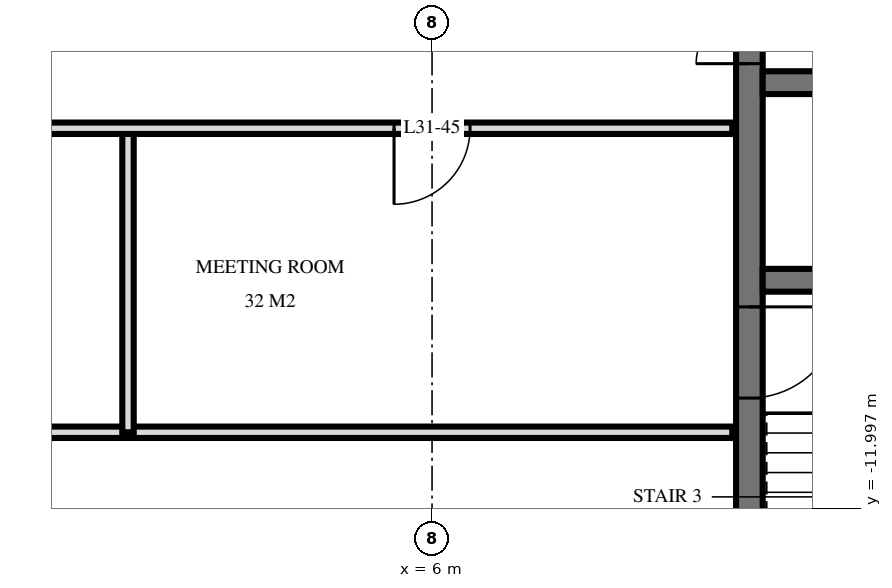
"""IFC4 building model, lengths in metres.
Left out: names, types, materials, properties, quantities, classifications, styles, units other than length and angle.
Written with IfcOpenShell. Run it as: python <this file> out.ifc"""

import sys

from ifc_helpers import new_model, si_unit, direction, frame, frame_2d, origin, place, context, subcontext, project, spatial, rectangle, extrude, element, fill, save


model = new_model("IFC4")
c1 = context("Model", 3, precision=1e-05, world=origin(), true_north=direction((0.0, 1.0)))
c2 = subcontext(c1, "Body", "Model", "MODEL_VIEW")
j1 = project(units=[si_unit("LENGTHUNIT", "METRE"), si_unit("PLANEANGLEUNIT", "RADIAN")], contexts=[c1])
p1 = place(None, origin())
s1 = spatial("IfcSite", under=j1, at=p1, CompositionType="ELEMENT")
p2 = place(p1, origin())
s2 = spatial("IfcBuilding", under=s1, at=p2, CompositionType="ELEMENT")
p3 = place(p2, frame((0.0, 0.0, 123.6)))
s3 = spatial("IfcBuildingStorey", under=s2, at=p3, CompositionType="ELEMENT", Elevation=123.6)
p4 = place(p3, frame((10.175, -14.55, 0.0), z_axis=(0.0, 0.0, 1.0), x_axis=(0.0, 1.0, 0.0)))
e1 = element("IfcWall", 1, at=p4, inside=s3, PredefinedType="SHEAR", context=c2, shape_type="SweptSolid", body=[
    extrude(rectangle(XDim=14.1, YDim=0.35, at=frame_2d((7.05, 0.0))), origin(), (0.0, 0.0, 1.0), 3.6),
])
p5 = place(p4, frame((8.4, 0.0, 0.0)))
e2 = element("IfcOpeningElement", 2, at=p5, cuts=e1, PredefinedType="OPENING", context=c2, shape_type="SweptSolid", body=[
    extrude(rectangle(XDim=1.4, YDim=2.4, at=frame_2d((0.7, 1.2))), frame((0.0, 0.185, 0.0), z_axis=(0.0, -1.0, 0.0), x_axis=(1.0, 0.0, 0.0)), (0.0, 0.0, 1.0), 0.37),
])
p6 = place(p4, frame((10.0, 0.0, 0.0)))
e3 = element("IfcOpeningElement", 3, at=p6, cuts=e1, PredefinedType="OPENING", context=c2, shape_type="SweptSolid", body=[
    extrude(rectangle(XDim=1.4, YDim=2.4, at=frame_2d((0.7, 1.2))), frame((0.0, 0.185, 0.0), z_axis=(0.0, -1.0, 0.0), x_axis=(1.0, 0.0, 0.0)), (0.0, 0.0, 1.0), 0.37),
])
p7 = place(p4, frame((4.0, 0.0, 0.0)))
e4 = element("IfcOpeningElement", 4, at=p7, cuts=e1, PredefinedType="OPENING", context=c2, shape_type="SweptSolid", body=[
    extrude(rectangle(XDim=1.2, YDim=2.1, at=frame_2d((0.6, 1.05))), frame((0.0, 0.185, 0.0), z_axis=(0.0, -1.0, 0.0), x_axis=(1.0, 0.0, 0.0)), (0.0, 0.0, 1.0), 0.37),
])
p8 = place(p3, frame((10.35, -6.4, 0.0), z_axis=(0.0, 0.0, 1.0), x_axis=(1.0, 0.0, 0.0)))
e5 = element("IfcWall", 5, at=p8, inside=s3, PredefinedType="SHEAR", context=c2, shape_type="SweptSolid", body=[
    extrude(rectangle(XDim=13.7, YDim=0.3, at=frame_2d((6.85, 0.0))), origin(), (0.0, 0.0, 1.0), 3.6),
])
p9 = place(p8, frame((12.05, 0.0, 0.0)))
e6 = element("IfcOpeningElement", 6, at=p9, cuts=e5, PredefinedType="OPENING", context=c2, shape_type="SweptSolid", body=[
    extrude(rectangle(XDim=1.1, YDim=2.1, at=frame_2d((0.55, 1.05))), frame((0.0, 0.16, 0.0), z_axis=(0.0, -1.0, 0.0), x_axis=(1.0, 0.0, 0.0)), (0.0, 0.0, 1.0), 0.32),
])
p10 = place(p8, frame((6.8, 0.0, 0.0)))
e7 = element("IfcOpeningElement", 7, at=p10, cuts=e5, PredefinedType="OPENING", context=c2, shape_type="SweptSolid", body=[
    extrude(rectangle(XDim=1.1, YDim=2.1, at=frame_2d((0.55, 1.05))), frame((0.0, 0.16, 0.0), z_axis=(0.0, -1.0, 0.0), x_axis=(1.0, 0.0, 0.0)), (0.0, 0.0, 1.0), 0.32),
])
p11 = place(p3, frame((10.35, -9.0, 0.0), z_axis=(0.0, 0.0, 1.0), x_axis=(1.0, 0.0, 0.0)))
e8 = element("IfcWall", 8, at=p11, inside=s3, PredefinedType="SHEAR", context=c2, shape_type="SweptSolid", body=[
    extrude(rectangle(XDim=13.7, YDim=0.3, at=frame_2d((6.85, 0.0))), origin(), (0.0, 0.0, 1.0), 3.6),
])
p12 = place(p11, frame((3.8, 0.0, 0.0)))
e9 = element("IfcOpeningElement", 9, at=p12, cuts=e8, PredefinedType="OPENING", context=c2, shape_type="SweptSolid", body=[
    extrude(rectangle(XDim=1.1, YDim=2.1, at=frame_2d((0.55, 1.05))), frame((0.0, 0.16, 0.0), z_axis=(0.0, -1.0, 0.0), x_axis=(1.0, 0.0, 0.0)), (0.0, 0.0, 1.0), 0.32),
])
p13 = place(p3, frame((2.0, -11.0, 0.0), z_axis=(0.0, 0.0, 1.0), x_axis=(0.0, 1.0, 0.0)))
e10 = element("IfcWall", 10, at=p13, inside=s3, PredefinedType="PARTITIONING", context=c2, shape_type="SweptSolid", body=[
    extrude(rectangle(XDim=4.0, YDim=0.15, at=frame_2d((2.0, 0.0))), origin(), (0.0, 0.0, 1.0), 3.32),
])
p14 = place(p3, frame((-9.95, -11.0, 0.0), z_axis=(0.0, 0.0, 1.0), x_axis=(1.0, 0.0, 0.0)))
e11 = element("IfcWall", 11, at=p14, inside=s3, PredefinedType="PARTITIONING", context=c2, shape_type="SweptSolid", body=[
    extrude(rectangle(XDim=19.9, YDim=0.15, at=frame_2d((9.95, 0.0))), origin(), (0.0, 0.0, 1.0), 3.32),
])
p15 = place(p14, frame((9.45, 0.0, 0.0)))
e12 = element("IfcOpeningElement", 12, at=p15, cuts=e11, PredefinedType="OPENING", context=c2, shape_type="SweptSolid", body=[
    extrude(rectangle(XDim=1.0, YDim=2.1, at=frame_2d((0.5, 1.05))), frame((0.0, 0.085, 0.0), z_axis=(0.0, -1.0, 0.0), x_axis=(1.0, 0.0, 0.0)), (0.0, 0.0, 1.0), 0.17),
])
p16 = place(p14, frame((3.45, 0.0, 0.0)))
e13 = element("IfcOpeningElement", 13, at=p16, cuts=e11, PredefinedType="OPENING", context=c2, shape_type="SweptSolid", body=[
    extrude(rectangle(XDim=1.0, YDim=2.1, at=frame_2d((0.5, 1.05))), frame((0.0, 0.085, 0.0), z_axis=(0.0, -1.0, 0.0), x_axis=(1.0, 0.0, 0.0)), (0.0, 0.0, 1.0), 0.17),
])
p17 = place(p3, frame((-9.95, -7.0, 0.0), z_axis=(0.0, 0.0, 1.0), x_axis=(1.0, 0.0, 0.0)))
e14 = element("IfcWall", 14, at=p17, inside=s3, PredefinedType="PARTITIONING", context=c2, shape_type="SweptSolid", body=[
    extrude(rectangle(XDim=19.9, YDim=0.15, at=frame_2d((9.95, 0.0))), origin(), (0.0, 0.0, 1.0), 3.32),
])
p18 = place(p17, frame((9.45, 0.0, 0.0)))
e15 = element("IfcOpeningElement", 15, at=p18, cuts=e14, PredefinedType="OPENING", context=c2, shape_type="SweptSolid", body=[
    extrude(rectangle(XDim=1.0, YDim=2.1, at=frame_2d((0.5, 1.05))), frame((0.0, 0.085, 0.0), z_axis=(0.0, -1.0, 0.0), x_axis=(1.0, 0.0, 0.0)), (0.0, 0.0, 1.0), 0.17),
])
p19 = place(p17, frame((15.45, 0.0, 0.0)))
e16 = element("IfcOpeningElement", 16, at=p19, cuts=e14, PredefinedType="OPENING", context=c2, shape_type="SweptSolid", body=[
    extrude(rectangle(XDim=1.0, YDim=2.1, at=frame_2d((0.5, 1.05))), frame((0.0, 0.085, 0.0), z_axis=(0.0, -1.0, 0.0), x_axis=(1.0, 0.0, 0.0)), (0.0, 0.0, 1.0), 0.17),
])
p20 = place(p5, origin())
e17 = element("IfcDoor", 17, at=p20, inside=s3, OperationType="DOUBLE_DOOR_SINGLE_SWING", PredefinedType="DOOR", context=c2, shape_type="SweptSolid", body=[
    extrude(rectangle(XDim=1.4, YDim=2.4, at=frame_2d((0.7, 1.2))), frame((0.0, 0.025, 0.0), z_axis=(0.0, -1.0, 0.0), x_axis=(1.0, 0.0, 0.0)), (0.0, 0.0, 1.0), 0.05),
])
fill(e2, e17)
p21 = place(p7, frame((0.6, 0.0, 0.0), z_axis=(0.0, 0.0, 1.0), x_axis=(-1.0, 0.0, 0.0)))
e18 = element("IfcDoor", 18, at=p21, inside=s3, OperationType="SINGLE_SWING_RIGHT", PredefinedType="DOOR", context=c2, shape_type="SweptSolid", body=[
    extrude(rectangle(XDim=1.2, YDim=2.1, at=frame_2d((0.0, 1.05))), frame((0.0, -0.025, 0.0), z_axis=(0.0, 1.0, 0.0), x_axis=(-1.0, 0.0, 0.0)), (0.0, 0.0, 1.0), 0.05),
])
fill(e4, e18)
p22 = place(p19, frame((0.5, 0.0, 0.0), z_axis=(0.0, 0.0, 1.0), x_axis=(-1.0, 0.0, 0.0)))
e19 = element("IfcDoor", 19, at=p22, inside=s3, OperationType="SINGLE_SWING_LEFT", PredefinedType="DOOR", context=c2, shape_type="SweptSolid", body=[
    extrude(rectangle(XDim=1.0, YDim=2.1, at=frame_2d((0.0, 1.05))), frame((0.0, -0.025, 0.0), z_axis=(0.0, 1.0, 0.0), x_axis=(-1.0, 0.0, 0.0)), (0.0, 0.0, 1.0), 0.05),
])
fill(e16, e19)
save(model, sys.argv[1])
